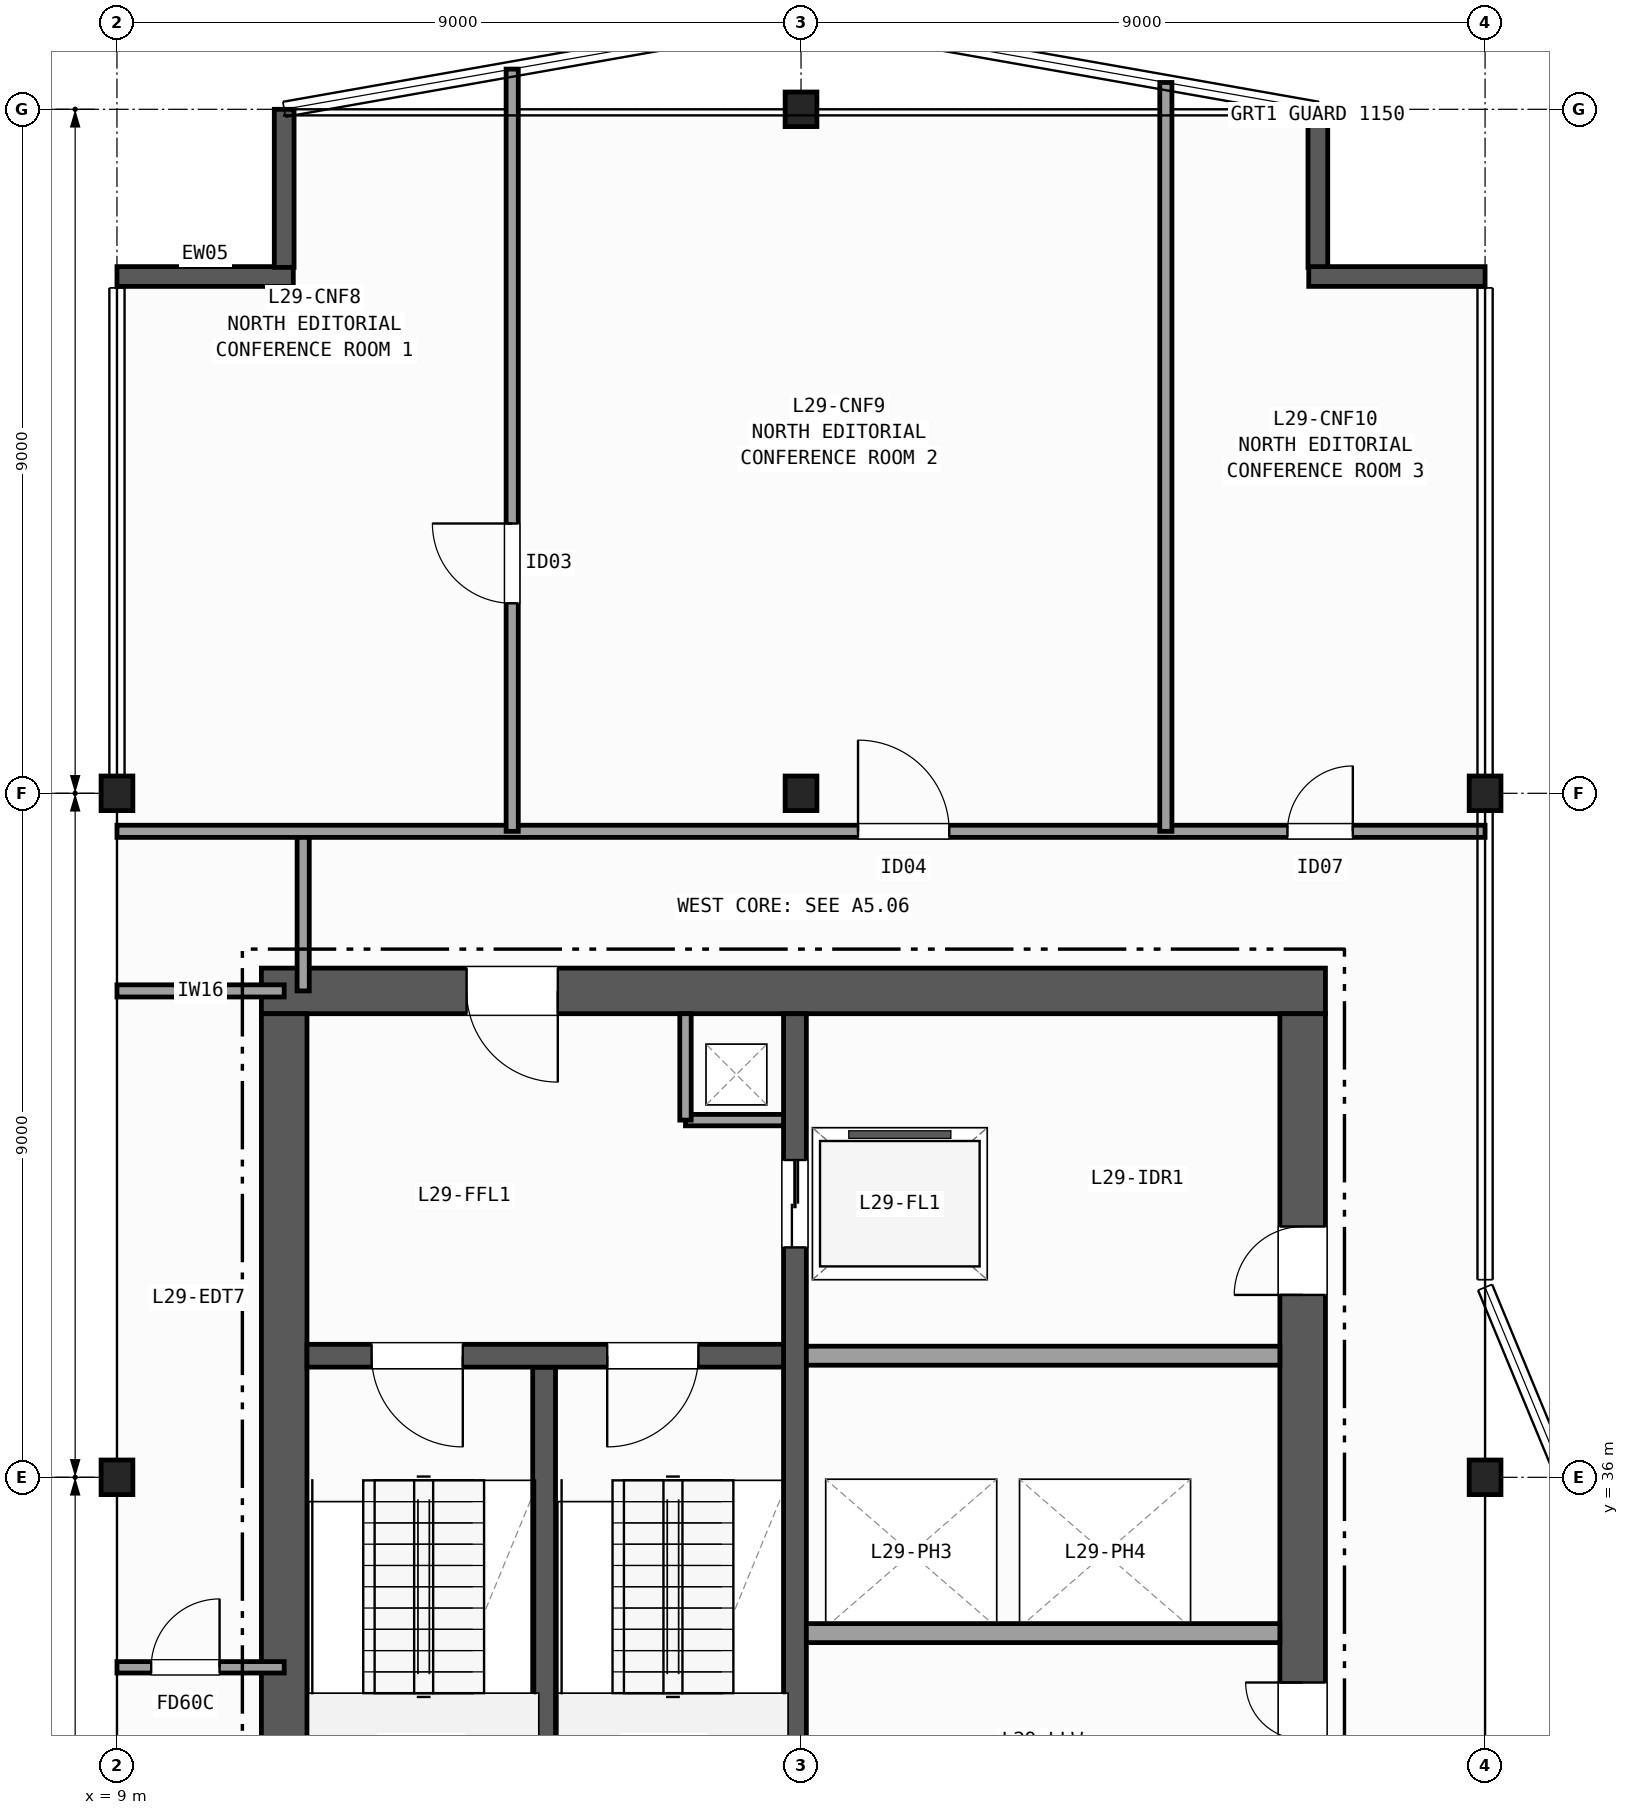
"""IFC4 building model, lengths in metres.
Left out: names, types, materials, properties, quantities, classifications, styles, units other than length and angle.
Written with IfcOpenShell. Run it as: python <this file> out.ifc"""

import sys

from ifc_helpers import new_model, si_unit, direction, frame, frame_2d, origin, origin_2d, place, context, subcontext, project, spatial, rectangle, i_section, extrude, element, fill, save


model = new_model("IFC4")
c1 = context("Model", 3, precision=1e-05, world=origin(), true_north=direction((0.0, 1.0)))
c2 = subcontext(c1, "Body", "Model", "MODEL_VIEW")
j1 = project(units=[si_unit("LENGTHUNIT", "METRE"), si_unit("PLANEANGLEUNIT", "RADIAN")], contexts=[c1])
p1 = place(None, origin())
s1 = spatial("IfcSite", under=j1, at=p1, CompositionType="ELEMENT")
p2 = place(p1, origin())
s2 = spatial("IfcBuilding", under=s1, at=p2, CompositionType="ELEMENT")
p3 = place(p2, frame((0.0, 0.0, 121.1)))
s3 = spatial("IfcBuildingStorey", under=s2, at=p3, CompositionType="ELEMENT", Elevation=121.1)
for number, where, z_axis, x_axis in (
    (1, (9.0, 36.0, 0.0), (0.0, 0.0, 1.0), (1.0, 0.0, 0.0)),
    (2, (9.0, 45.0, 0.0), (0.0, 0.0, 1.0), (1.0, 0.0, 0.0)),
    (3, (18.0, 45.0, 0.0), (0.0, 0.0, 1.0), (1.0, 0.0, 0.0)),
    (4, (18.0, 54.0, 0.0), (0.0, 0.0, 1.0), (1.0, 0.0, 0.0)),
    (5, (27.0, 36.0, 0.0), (0.0, 0.0, 1.0), (1.0, 0.0, 0.0)),
    (6, (27.0, 45.0, 0.0), (0.0, 0.0, 1.0), (1.0, 0.0, 0.0)),
):
    element("IfcColumn", number, at=place(p3, frame(where, z_axis=z_axis, x_axis=x_axis)), inside=s3, PredefinedType="COLUMN", context=c2, shape_type="SweptSolid", body=[
        extrude(i_section(OverallWidth=0.418, OverallDepth=0.455, WebThickness=0.042, FlangeThickness=0.068, FilletRadius=0.015, at=origin_2d()), origin(), (0.0, 0.0, 1.0), 3.7),
    ])
p4 = place(p3, frame((9.0, 51.8, 0.0), z_axis=(0.0, 0.0, 1.0), x_axis=(1.0, 0.0, 0.0)))
e7 = element("IfcWall", 7, at=p4, inside=s3, PredefinedType="SOLIDWALL", context=c2, shape_type="SweptSolid", body=[
    extrude(rectangle(XDim=2.32, YDim=0.26, at=frame_2d((1.16, 0.0))), origin(), (0.0, 0.0, 1.0), 3.42),
])
for number, where, z_axis, x_axis in (
    (8, (11.2, 51.92, 0.0), (0.0, 0.0, 1.0), (0.0, 1.0, 0.0)),
    (9, (24.8, 54.0, 0.0), (0.0, 0.0, 1.0), (0.0, -1.0, 0.0)),
):
    element("IfcWall", number, at=place(p3, frame(where, z_axis=z_axis, x_axis=x_axis)), inside=s3, PredefinedType="SOLIDWALL", context=c2, shape_type="SweptSolid", body=[
        extrude(rectangle(XDim=2.08, YDim=0.26, at=frame_2d((1.04, 0.0))), origin(), (0.0, 0.0, 1.0), 3.42),
    ])
p5 = place(p3, frame((24.68, 51.8, 0.0), z_axis=(0.0, 0.0, 1.0), x_axis=(1.0, 0.0, 0.0)))
e10 = element("IfcWall", 10, at=p5, inside=s3, PredefinedType="SOLIDWALL", context=c2, shape_type="SweptSolid", body=[
    extrude(rectangle(XDim=2.32, YDim=0.26, at=frame_2d((1.16, 0.0))), origin(), (0.0, 0.0, 1.0), 3.42),
])
p6 = place(p3, frame((24.9, 42.4, 0.0), z_axis=(0.0, 0.0, 1.0), x_axis=(-1.0, 0.0, 0.0)))
e11 = element("IfcWall", 11, at=p6, inside=s3, PredefinedType="SHEAR", context=c2, shape_type="SweptSolid", body=[
    extrude(rectangle(XDim=14.0, YDim=0.6, at=frame_2d((7.0, 0.0))), origin(), (0.0, 0.0, 1.0), 3.42),
])
p7 = place(p6, frame((10.1, 0.0, 0.0)))
e12 = element("IfcOpeningElement", 12, at=p7, cuts=e11, PredefinedType="OPENING", context=c2, shape_type="SweptSolid", body=[
    extrude(rectangle(XDim=1.2, YDim=2.15, at=frame_2d((0.6, 1.075))), frame((0.0, 0.31, 0.0), z_axis=(0.0, -1.0, 0.0), x_axis=(1.0, 0.0, 0.0)), (0.0, 0.0, 1.0), 0.62),
])
p8 = place(p3, frame((11.2, 42.1, 0.0), z_axis=(0.0, 0.0, 1.0), x_axis=(0.0, -1.0, 0.0)))
e13 = element("IfcWall", 13, at=p8, inside=s3, PredefinedType="SHEAR", context=c2, shape_type="SweptSolid", body=[
    extrude(rectangle(XDim=13.6, YDim=0.6, at=frame_2d((6.8, 0.0))), origin(), (0.0, 0.0, 1.0), 3.42),
])
p9 = place(p3, frame((24.6, 28.5, 0.0), z_axis=(0.0, 0.0, 1.0), x_axis=(0.0, 1.0, 0.0)))
e14 = element("IfcWall", 14, at=p9, inside=s3, PredefinedType="SHEAR", context=c2, shape_type="SweptSolid", body=[
    extrude(rectangle(XDim=13.6, YDim=0.6, at=frame_2d((6.8, 0.0))), origin(), (0.0, 0.0, 1.0), 3.42),
])
p10 = place(p9, frame((3.3, 0.0, 0.0)))
e15 = element("IfcOpeningElement", 15, at=p10, cuts=e14, PredefinedType="OPENING", context=c2, shape_type="SweptSolid", body=[
    extrude(rectangle(XDim=1.5, YDim=2.2, at=frame_2d((0.75, 1.1))), frame((0.0, 0.31, 0.0), z_axis=(0.0, -1.0, 0.0), x_axis=(1.0, 0.0, 0.0)), (0.0, 0.0, 1.0), 0.62),
])
p11 = place(p9, frame((9.9, 0.0, 0.0)))
e16 = element("IfcOpeningElement", 16, at=p11, cuts=e14, PredefinedType="OPENING", context=c2, shape_type="SweptSolid", body=[
    extrude(rectangle(XDim=0.9, YDim=2.1, at=frame_2d((0.45, 1.05))), frame((0.0, 0.31, 0.0), z_axis=(0.0, -1.0, 0.0), x_axis=(1.0, 0.0, 0.0)), (0.0, 0.0, 1.0), 0.62),
])
p12 = place(p3, frame((14.62, 28.5, 0.0), z_axis=(0.0, 0.0, 1.0), x_axis=(0.0, 1.0, 0.0)))
e17 = element("IfcWall", 17, at=p12, inside=s3, PredefinedType="SHEAR", context=c2, shape_type="SweptSolid", body=[
    extrude(rectangle(XDim=8.95, YDim=0.3, at=frame_2d((4.475, 0.0))), origin(), (0.0, 0.0, 1.0), 3.42),
])
p13 = place(p3, frame((17.92, 42.1, 0.0), z_axis=(0.0, 0.0, 1.0), x_axis=(0.0, -1.0, 0.0)))
e18 = element("IfcWall", 18, at=p13, inside=s3, PredefinedType="SHEAR", context=c2, shape_type="SweptSolid", body=[
    extrude(rectangle(XDim=13.6, YDim=0.3, at=frame_2d((6.8, 0.0))), origin(), (0.0, 0.0, 1.0), 3.42),
])
p14 = place(p13, frame((1.925, 0.0, 0.0)))
e19 = element("IfcOpeningElement", 19, at=p14, cuts=e18, PredefinedType="OPENING", context=c2, shape_type="SweptSolid", body=[
    extrude(rectangle(XDim=1.15, YDim=2.15, at=frame_2d((0.575, 1.075))), frame((0.0, 0.16, 0.0), z_axis=(0.0, -1.0, 0.0), x_axis=(1.0, 0.0, 0.0)), (0.0, 0.0, 1.0), 0.32),
])
p15 = place(p3, frame((17.77, 37.6, 0.0), z_axis=(0.0, 0.0, 1.0), x_axis=(-1.0, 0.0, 0.0)))
e20 = element("IfcWall", 20, at=p15, inside=s3, PredefinedType="SHEAR", context=c2, shape_type="SweptSolid", body=[
    extrude(rectangle(XDim=6.27, YDim=0.3, at=frame_2d((3.135, 0.0))), origin(), (0.0, 0.0, 1.0), 3.42),
])
p16 = place(p15, frame((4.22, 0.0, 0.0)))
e21 = element("IfcOpeningElement", 21, at=p16, cuts=e20, PredefinedType="OPENING", context=c2, shape_type="SweptSolid", body=[
    extrude(rectangle(XDim=1.2, YDim=2.15, at=frame_2d((0.6, 1.075))), frame((0.0, 0.16, 0.0), z_axis=(0.0, -1.0, 0.0), x_axis=(1.0, 0.0, 0.0)), (0.0, 0.0, 1.0), 0.32),
])
p17 = place(p15, frame((1.12, 0.0, 0.0)))
e22 = element("IfcOpeningElement", 22, at=p17, cuts=e20, PredefinedType="OPENING", context=c2, shape_type="SweptSolid", body=[
    extrude(rectangle(XDim=1.2, YDim=2.15, at=frame_2d((0.6, 1.075))), frame((0.0, 0.16, 0.0), z_axis=(0.0, -1.0, 0.0), x_axis=(1.0, 0.0, 0.0)), (0.0, 0.0, 1.0), 0.32),
])
p18 = place(p3, frame((16.48, 40.7, 0.0), z_axis=(0.0, 0.0, 1.0), x_axis=(1.0, 0.0, 0.0)))
e23 = element("IfcWall", 23, at=p18, inside=s3, PredefinedType="PARTITIONING", context=c2, shape_type="SweptSolid", body=[
    extrude(rectangle(XDim=1.29, YDim=0.15, at=frame_2d((0.645, 0.0))), origin(), (0.0, 0.0, 1.0), 3.42),
])
p19 = place(p3, frame((16.48, 40.7, 0.0), z_axis=(0.0, 0.0, 1.0), x_axis=(0.0, 1.0, 0.0)))
e24 = element("IfcWall", 24, at=p19, inside=s3, PredefinedType="PARTITIONING", context=c2, shape_type="SweptSolid", body=[
    extrude(rectangle(XDim=1.4, YDim=0.15, at=frame_2d((0.7, 0.0))), origin(), (0.0, 0.0, 1.0), 3.42),
])
for number, where, z_axis, x_axis in (
    (25, (18.07, 37.6, 0.0), (0.0, 0.0, 1.0), (1.0, 0.0, 0.0)),
    (26, (24.3, 33.95, 0.0), (0.0, 0.0, 1.0), (-1.0, 0.0, 0.0)),
):
    element("IfcWall", number, at=place(p3, frame(where, z_axis=z_axis, x_axis=x_axis)), inside=s3, PredefinedType="PARTITIONING", context=c2, shape_type="SweptSolid", body=[
        extrude(rectangle(XDim=6.23, YDim=0.25, at=frame_2d((3.115, 0.0))), origin(), (0.0, 0.0, 1.0), 3.42),
    ])
p20 = place(p3, frame((9.0, 42.4, 0.0), z_axis=(0.0, 0.0, 1.0), x_axis=(1.0, 0.0, 0.0)))
e27 = element("IfcWall", 27, at=p20, inside=s3, PredefinedType="PARTITIONING", context=c2, shape_type="SweptSolid", body=[
    extrude(rectangle(XDim=2.2, YDim=0.16, at=frame_2d((1.1, 0.0))), origin(), (0.0, 0.0, 1.0), 2.634),
])
p21 = place(p3, frame((11.45, 42.4, 0.0), z_axis=(0.0, 0.0, 1.0), x_axis=(0.0, 1.0, 0.0)))
e28 = element("IfcWall", 28, at=p21, inside=s3, PredefinedType="PARTITIONING", context=c2, shape_type="SweptSolid", body=[
    extrude(rectangle(XDim=2.1, YDim=0.16, at=frame_2d((1.05, 0.0))), origin(), (0.0, 0.0, 1.0), 3.42),
])
p22 = place(p3, frame((9.0, 33.5, 0.0), z_axis=(0.0, 0.0, 1.0), x_axis=(1.0, 0.0, 0.0)))
e29 = element("IfcWall", 29, at=p22, inside=s3, PredefinedType="PARTITIONING", context=c2, shape_type="SweptSolid", body=[
    extrude(rectangle(XDim=2.2, YDim=0.15, at=frame_2d((1.1, 0.0))), origin(), (0.0, 0.0, 1.0), 2.634),
])
p23 = place(p22, frame((0.45, 0.0, 0.0)))
e30 = element("IfcOpeningElement", 30, at=p23, cuts=e29, PredefinedType="OPENING", context=c2, shape_type="SweptSolid", body=[
    extrude(rectangle(XDim=0.9, YDim=2.1, at=frame_2d((0.45, 1.05))), frame((0.0, 0.085, 0.0), z_axis=(0.0, -1.0, 0.0), x_axis=(1.0, 0.0, 0.0)), (0.0, 0.0, 1.0), 0.17),
])
p24 = place(p3, frame((9.0, 44.5, 0.0), z_axis=(0.0, 0.0, 1.0), x_axis=(1.0, 0.0, 0.0)))
e31 = element("IfcWall", 31, at=p24, inside=s3, PredefinedType="PARTITIONING", context=c2, shape_type="SweptSolid", body=[
    extrude(rectangle(XDim=18.0, YDim=0.16, at=frame_2d((9.0, 0.0))), origin(), (0.0, 0.0, 1.0), 2.634),
])
p25 = place(p24, frame((9.75, 0.0, 0.0)))
e32 = element("IfcOpeningElement", 32, at=p25, cuts=e31, PredefinedType="OPENING", context=c2, shape_type="SweptSolid", body=[
    extrude(rectangle(XDim=1.2, YDim=2.15, at=frame_2d((0.6, 1.075))), frame((0.0, 0.09, 0.0), z_axis=(0.0, -1.0, 0.0), x_axis=(1.0, 0.0, 0.0)), (0.0, 0.0, 1.0), 0.18),
])
p26 = place(p24, frame((15.4, 0.0, 0.0)))
e33 = element("IfcOpeningElement", 33, at=p26, cuts=e31, PredefinedType="OPENING", context=c2, shape_type="SweptSolid", body=[
    extrude(rectangle(XDim=0.86, YDim=2.05, at=frame_2d((0.43, 1.025))), frame((0.0, 0.09, 0.0), z_axis=(0.0, -1.0, 0.0), x_axis=(1.0, 0.0, 0.0)), (0.0, 0.0, 1.0), 0.18),
])
p27 = place(p3, frame((14.2, 44.5, 0.0), z_axis=(0.0, 0.0, 1.0), x_axis=(0.0, 1.0, 0.0)))
e34 = element("IfcWall", 34, at=p27, inside=s3, PredefinedType="PARTITIONING", context=c2, shape_type="SweptSolid", body=[
    extrude(rectangle(XDim=10.029, YDim=0.16, at=frame_2d((5.015, 0.0))), origin(), (0.0, 0.0, 1.0), 3.42),
])
p28 = place(p27, frame((3.0, 0.0, 0.0)))
e35 = element("IfcOpeningElement", 35, at=p28, cuts=e34, PredefinedType="OPENING", context=c2, shape_type="SweptSolid", body=[
    extrude(rectangle(XDim=1.05, YDim=2.15, at=frame_2d((0.525, 1.075))), frame((0.0, 0.09, 0.0), z_axis=(0.0, -1.0, 0.0), x_axis=(1.0, 0.0, 0.0)), (0.0, 0.0, 1.0), 0.18),
])
p29 = place(p3, frame((22.8, 44.5, 0.0), z_axis=(0.0, 0.0, 1.0), x_axis=(0.0, 1.0, 0.0)))
e36 = element("IfcWall", 36, at=p29, inside=s3, PredefinedType="PARTITIONING", context=c2, shape_type="SweptSolid", body=[
    extrude(rectangle(XDim=9.853, YDim=0.16, at=frame_2d((4.927, 0.0))), origin(), (0.0, 0.0, 1.0), 3.42),
])
p30 = place(p16, origin())
e37 = element("IfcDoor", 37, at=p30, inside=s3, OperationType="SINGLE_SWING_LEFT", PredefinedType="DOOR", context=c2, shape_type="SweptSolid", body=[
    extrude(rectangle(XDim=1.2, YDim=2.15, at=frame_2d((0.6, 1.075))), frame((0.0, 0.025, 0.0), z_axis=(0.0, -1.0, 0.0), x_axis=(1.0, 0.0, 0.0)), (0.0, 0.0, 1.0), 0.05),
])
fill(e21, e37)
p31 = place(p17, origin())
e38 = element("IfcDoor", 38, at=p31, inside=s3, OperationType="SINGLE_SWING_RIGHT", PredefinedType="DOOR", context=c2, shape_type="SweptSolid", body=[
    extrude(rectangle(XDim=1.2, YDim=2.15, at=frame_2d((0.6, 1.075))), frame((0.0, 0.025, 0.0), z_axis=(0.0, -1.0, 0.0), x_axis=(1.0, 0.0, 0.0)), (0.0, 0.0, 1.0), 0.05),
])
fill(e22, e38)
p32 = place(p10, origin())
e39 = element("IfcDoor", 39, at=p32, inside=s3, OperationType="DOUBLE_DOOR_SINGLE_SWING", PredefinedType="DOOR", context=c2, shape_type="SweptSolid", body=[
    extrude(rectangle(XDim=1.5, YDim=2.2, at=frame_2d((0.75, 1.1))), frame((0.0, 0.025, 0.0), z_axis=(0.0, -1.0, 0.0), x_axis=(1.0, 0.0, 0.0)), (0.0, 0.0, 1.0), 0.05),
])
fill(e15, e39)
p33 = place(p7, origin())
e40 = element("IfcDoor", 40, at=p33, inside=s3, OperationType="SINGLE_SWING_LEFT", PredefinedType="DOOR", context=c2, shape_type="SweptSolid", body=[
    extrude(rectangle(XDim=1.2, YDim=2.15, at=frame_2d((0.6, 1.075))), frame((0.0, 0.025, 0.0), z_axis=(0.0, -1.0, 0.0), x_axis=(1.0, 0.0, 0.0)), (0.0, 0.0, 1.0), 0.05),
])
fill(e12, e40)
p34 = place(p11, origin())
e41 = element("IfcDoor", 41, at=p34, inside=s3, OperationType="SINGLE_SWING_LEFT", PredefinedType="DOOR", context=c2, shape_type="SweptSolid", body=[
    extrude(rectangle(XDim=0.9, YDim=2.1, at=frame_2d((0.45, 1.05))), frame((0.0, 0.025, 0.0), z_axis=(0.0, -1.0, 0.0), x_axis=(1.0, 0.0, 0.0)), (0.0, 0.0, 1.0), 0.05),
])
fill(e16, e41)
p35 = place(p14, origin())
e42 = element("IfcDoor", 42, at=p35, inside=s3, OperationType="DOUBLE_DOOR_SLIDING", PredefinedType="DOOR", context=c2, shape_type="SweptSolid", body=[
    extrude(rectangle(XDim=1.15, YDim=2.15, at=frame_2d((0.575, 1.075))), frame((0.0, 0.025, 0.0), z_axis=(0.0, -1.0, 0.0), x_axis=(1.0, 0.0, 0.0)), (0.0, 0.0, 1.0), 0.05),
])
fill(e19, e42)
p36 = place(p23, origin())
e43 = element("IfcDoor", 43, at=p36, inside=s3, OperationType="SINGLE_SWING_RIGHT", PredefinedType="DOOR", context=c2, shape_type="SweptSolid", body=[
    extrude(rectangle(XDim=0.9, YDim=2.1, at=frame_2d((0.45, 1.05))), frame((0.0, 0.025, 0.0), z_axis=(0.0, -1.0, 0.0), x_axis=(1.0, 0.0, 0.0)), (0.0, 0.0, 1.0), 0.05),
])
fill(e30, e43)
p37 = place(p28, origin())
e44 = element("IfcDoor", 44, at=p37, inside=s3, OperationType="SINGLE_SWING_RIGHT", PredefinedType="DOOR", context=c2, shape_type="SweptSolid", body=[
    extrude(rectangle(XDim=1.05, YDim=2.15, at=frame_2d((0.525, 1.075))), frame((0.0, 0.025, 0.0), z_axis=(0.0, -1.0, 0.0), x_axis=(1.0, 0.0, 0.0)), (0.0, 0.0, 1.0), 0.05),
])
fill(e35, e44)
p38 = place(p25, origin())
e45 = element("IfcDoor", 45, at=p38, inside=s3, OperationType="SINGLE_SWING_LEFT", PredefinedType="DOOR", context=c2, shape_type="SweptSolid", body=[
    extrude(rectangle(XDim=1.2, YDim=2.15, at=frame_2d((0.6, 1.075))), frame((0.0, 0.025, 0.0), z_axis=(0.0, -1.0, 0.0), x_axis=(1.0, 0.0, 0.0)), (0.0, 0.0, 1.0), 0.05),
])
fill(e32, e45)
p39 = place(p26, origin())
e46 = element("IfcDoor", 46, at=p39, inside=s3, OperationType="SINGLE_SWING_RIGHT", PredefinedType="DOOR", context=c2, shape_type="SweptSolid", body=[
    extrude(rectangle(XDim=0.86, YDim=2.05, at=frame_2d((0.43, 1.025))), frame((0.0, 0.025, 0.0), z_axis=(0.0, -1.0, 0.0), x_axis=(1.0, 0.0, 0.0)), (0.0, 0.0, 1.0), 0.05),
])
fill(e33, e46)
save(model, sys.argv[1])
